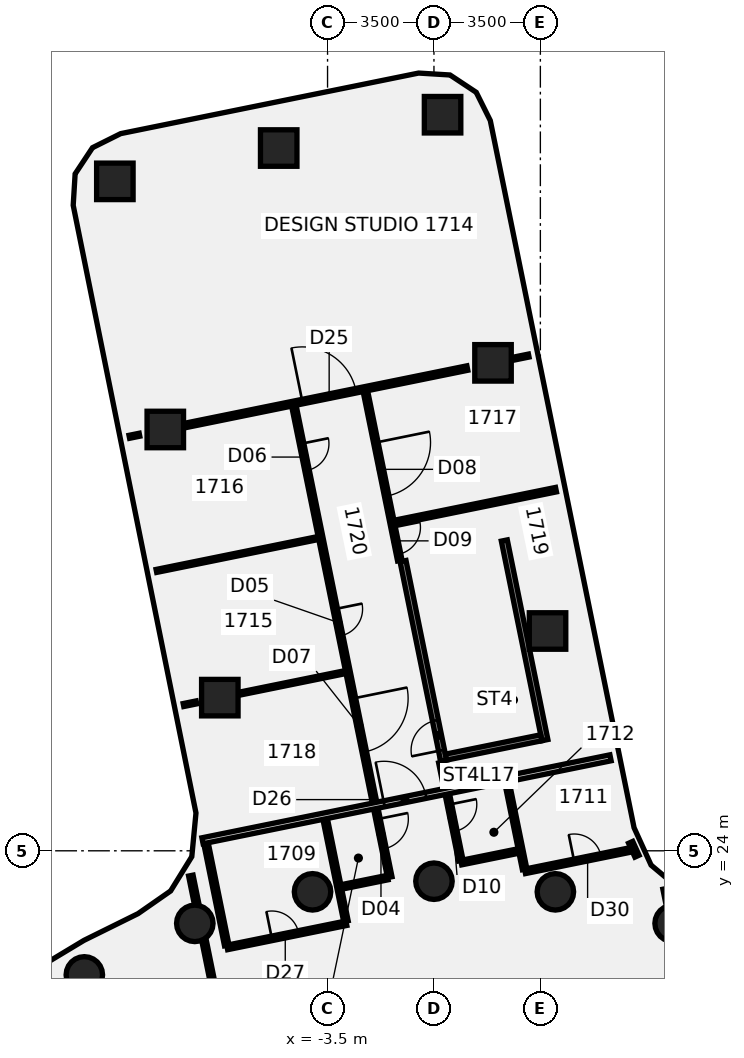
"""IFC4 building model, lengths in metres.
Left out: names, types, materials, properties, quantities, classifications, styles, units other than length and angle.
Written with IfcOpenShell. Run it as: python <this file> out.ifc"""

import sys

from ifc_helpers import new_model, si_unit, direction, frame, frame_2d, origin, origin_2d, place, context, subcontext, project, spatial, polyline, rectangle, circle, outline, extrude, element, fill, save


model = new_model("IFC4")
c1 = context("Model", 3, precision=1e-05, world=origin(), true_north=direction((0.0, 1.0)))
c2 = subcontext(c1, "Body", "Model", "MODEL_VIEW")
j1 = project(units=[si_unit("LENGTHUNIT", "METRE"), si_unit("PLANEANGLEUNIT", "RADIAN")], contexts=[c1])
p1 = place(None, origin())
s1 = spatial("IfcSite", under=j1, at=p1, CompositionType="ELEMENT")
p2 = place(p1, origin())
s2 = spatial("IfcBuilding", under=s1, at=p2, CompositionType="ELEMENT")
p3 = place(p2, frame((0.0, 0.0, 75.25)))
s3 = spatial("IfcBuildingStorey", under=s2, at=p3, CompositionType="ELEMENT", Elevation=75.25)
for number, where, z_axis, x_axis in (
    (1, (7.866, 21.613, -0.14), (0.0, 0.0, 1.0), (1.0, 0.0, 0.0)),
    (2, (3.994, 22.651, -0.14), (0.0, 0.0, 1.0), (1.0, 0.0, 0.0)),
    (3, (0.0, 23.0, -0.14), (0.0, 0.0, 1.0), (1.0, 0.0, 0.0)),
    (4, (-3.994, 22.651, -0.14), (0.0, 0.0, 1.0), (1.0, 0.0, 0.0)),
    (5, (-7.866, 21.613, -0.14), (0.0, 0.0, 1.0), (1.0, 0.0, 0.0)),
    (6, (-11.5, 19.919, -0.14), (0.0, 0.0, 1.0), (1.0, 0.0, 0.0)),
):
    element("IfcColumn", number, at=place(p3, frame(where, z_axis=z_axis, x_axis=x_axis)), inside=s3, PredefinedType="COLUMN", context=c2, shape_type="SweptSolid", body=[
        extrude(circle(Radius=0.6, at=origin_2d()), origin(), (0.0, 0.0, 1.0), 3.71),
    ])
p4 = place(p3, frame((-8.837, 37.857, -0.138), z_axis=(-0.07725535249, -0.043948835728, 0.996042223176), x_axis=(0.97674033462, 0.197093187203, 0.084454687756)))
e7 = element("IfcColumn", 7, at=p4, inside=s3, PredefinedType="COLUMN", context=c2, shape_type="SweptSolid", body=[
    extrude(rectangle(XDim=1.2, YDim=1.2, at=origin_2d()), origin(), (0.0, 0.0, 1.0), 3.716),
])
p5 = place(p3, frame((1.943, 40.049, -0.138), z_axis=(-0.088440845648, 0.008673247864, 0.996043669521), x_axis=(0.198432607845, -0.979765603585, 0.026150758614)))
e8 = element("IfcColumn", 8, at=p5, inside=s3, PredefinedType="COLUMN", context=c2, shape_type="SweptSolid", body=[
    extrude(rectangle(XDim=1.2, YDim=1.2, at=origin_2d()), origin(), (0.0, 0.0, 1.0), 3.716),
])
p6 = place(p3, frame((-7.043, 29.038, -0.139), z_axis=(-0.034232693176, -0.034891014198, 0.998804655499), x_axis=(0.979256198152, 0.198537646121, 0.040498166061)))
e9 = element("IfcColumn", 9, at=p6, inside=s3, PredefinedType="COLUMN", context=c2, shape_type="SweptSolid", body=[
    extrude(rectangle(XDim=1.2, YDim=1.2, at=origin_2d()), origin(), (0.0, 0.0, 1.0), 3.708),
])
p7 = place(p3, frame((3.736, 31.229, -0.139), z_axis=(-0.045427257265, 0.017907556487, 0.99880713039), x_axis=(0.198653368973, -0.979708767156, 0.026600198356)))
e10 = element("IfcColumn", 10, at=p7, inside=s3, PredefinedType="COLUMN", context=c2, shape_type="SweptSolid", body=[
    extrude(rectangle(XDim=1.2, YDim=1.2, at=origin_2d()), origin(), (0.0, 0.0, 1.0), 3.708),
])
p8 = place(p3, frame((0.283, 48.21, -0.138), z_axis=(-0.127200295059, -0.002356773352, 0.991874251383), x_axis=(0.197697779503, -0.979992577374, 0.023024688323)))
e11 = element("IfcColumn", 11, at=p8, inside=s3, PredefinedType="COLUMN", context=c2, shape_type="SweptSolid", body=[
    extrude(rectangle(XDim=1.2, YDim=1.2, at=origin_2d()), origin(), (0.0, 0.0, 1.0), 3.729),
])
p9 = place(p3, frame((-5.106, 47.114, -0.138), z_axis=(-0.121695461927, -0.028607271039, 0.992155148447), x_axis=(0.972318457177, 0.197441138054, 0.124955251334)))
e12 = element("IfcColumn", 12, at=p9, inside=s3, PredefinedType="COLUMN", context=c2, shape_type="SweptSolid", body=[
    extrude(rectangle(XDim=1.2, YDim=1.2, at=origin_2d()), origin(), (0.0, 0.0, 1.0), 3.729),
])
p10 = place(p3, frame((-10.496, 46.018, -0.138), z_axis=(-0.116046339335, -0.054848749218, 0.991728219744), x_axis=(0.972644227532, 0.1960216138, 0.124654456691)))
e13 = element("IfcColumn", 13, at=p10, inside=s3, PredefinedType="COLUMN", context=c2, shape_type="SweptSolid", body=[
    extrude(rectangle(XDim=1.2, YDim=1.2, at=origin_2d()), origin(), (0.0, 0.0, 1.0), 3.73),
])
p11 = place(p3, frame((-7.997, 23.185, 0.0), z_axis=(0.0, 0.0, 1.0), x_axis=(0.199166137736, -0.979965738982, 0.0)))
e14 = element("IfcWall", 14, at=p11, inside=s3, PredefinedType="PARTITIONING", context=c2, shape_type="SweptSolid", body=[
    extrude(rectangle(XDim=1.0, YDim=0.15, at=frame_2d((0.5, 0.0))), origin(), (0.0, 0.0, 1.0), 2.97),
])
p12 = place(p3, frame((-7.569, 21.083, 0.0), z_axis=(0.0, 0.0, 1.0), x_axis=(0.199292052779, -0.979940139855, 0.0)))
e15 = element("IfcWall", 15, at=p12, inside=s3, PredefinedType="PARTITIONING", context=c2, shape_type="SweptSolid", body=[
    extrude(rectangle(XDim=9.296, YDim=0.15, at=frame_2d((4.648, 0.0))), origin(), (0.0, 0.0, 1.0), 2.97),
])
p13 = place(p3, frame((-7.499, 24.251, 0.0), z_axis=(0.0, 0.0, 1.0), x_axis=(0.199153914045, -0.97996822322, 0.0)))
e16 = element("IfcWall", 16, at=p13, inside=s3, PredefinedType="PARTITIONING", context=c2, shape_type="SweptSolid", body=[
    extrude(rectangle(XDim=3.43, YDim=0.15, at=frame_2d((1.715, 0.0))), origin(), (0.0, 0.0, 1.0), 2.97),
])
p14 = place(p3, frame((-4.608, 38.64, 0.0), z_axis=(0.0, 0.0, 1.0), x_axis=(0.199328235369, -0.979932780646, 0.0)))
e17 = element("IfcWall", 17, at=p14, inside=s3, PredefinedType="PARTITIONING", context=c2, shape_type="SweptSolid", body=[
    extrude(rectangle(XDim=15.825, YDim=0.15, at=frame_2d((7.912, 0.0))), origin(), (0.0, 0.0, 1.0), 2.87),
])
p15 = place(p14, frame((13.875, 0.0, 0.0)))
e18 = element("IfcOpeningElement", 18, at=p15, cuts=e17, PredefinedType="OPENING", context=c2, shape_type="SweptSolid", body=[
    extrude(rectangle(XDim=1.0, YDim=2.1, at=frame_2d((0.5, 1.05))), frame((0.0, 0.085, 0.0), z_axis=(0.0, -1.0, 0.0), x_axis=(1.0, 0.0, 0.0)), (0.0, 0.0, 1.0), 0.17),
])
p16 = place(p14, frame((6.825, 0.0, 0.0)))
e19 = element("IfcOpeningElement", 19, at=p16, cuts=e17, PredefinedType="OPENING", context=c2, shape_type="SweptSolid", body=[
    extrude(rectangle(XDim=0.9, YDim=2.1, at=frame_2d((0.45, 1.05))), frame((0.0, 0.085, 0.0), z_axis=(0.0, -1.0, 0.0), x_axis=(1.0, 0.0, 0.0)), (0.0, 0.0, 1.0), 0.17),
])
p17 = place(p14, frame((1.275, 0.0, 0.0)))
e20 = element("IfcOpeningElement", 20, at=p17, cuts=e17, PredefinedType="OPENING", context=c2, shape_type="SweptSolid", body=[
    extrude(rectangle(XDim=0.9, YDim=2.1, at=frame_2d((0.45, 1.05))), frame((0.0, 0.085, 0.0), z_axis=(0.0, -1.0, 0.0), x_axis=(1.0, 0.0, 0.0)), (0.0, 0.0, 1.0), 0.17),
])
p18 = place(p14, frame((9.825, 0.0, 0.0)))
e21 = element("IfcOpeningElement", 21, at=p18, cuts=e17, PredefinedType="OPENING", context=c2, shape_type="SweptSolid", body=[
    extrude(rectangle(XDim=1.8, YDim=2.1, at=frame_2d((0.9, 1.05))), frame((0.0, 0.085, 0.0), z_axis=(0.0, -1.0, 0.0), x_axis=(1.0, 0.0, 0.0)), (0.0, 0.0, 1.0), 0.17),
])
p19 = place(p3, frame((-3.579, 25.048, 0.0), z_axis=(0.0, 0.0, 1.0), x_axis=(0.199140023723, -0.979971045976, 0.0)))
e22 = element("IfcWall", 22, at=p19, inside=s3, PredefinedType="PARTITIONING", context=c2, shape_type="SweptSolid", body=[
    extrude(rectangle(XDim=3.43, YDim=0.15, at=frame_2d((1.715, 0.0))), origin(), (0.0, 0.0, 1.0), 2.87),
])
p20 = place(p3, frame((-2.256, 39.118, 0.0), z_axis=(0.0, 0.0, 1.0), x_axis=(0.199270008321, -0.979944622815, 0.0)))
e23 = element("IfcWall", 23, at=p20, inside=s3, PredefinedType="PARTITIONING", context=c2, shape_type="SweptSolid", body=[
    extrude(rectangle(XDim=5.685, YDim=0.15, at=frame_2d((2.842, 0.0))), origin(), (0.0, 0.0, 1.0), 2.87),
])
p21 = place(p20, frame((1.725, 0.0, 0.0)))
e24 = element("IfcOpeningElement", 24, at=p21, cuts=e23, PredefinedType="OPENING", context=c2, shape_type="SweptSolid", body=[
    extrude(rectangle(XDim=1.8, YDim=2.1, at=frame_2d((0.9, 1.05))), frame((0.0, 0.085, 0.0), z_axis=(0.0, -1.0, 0.0), x_axis=(1.0, 0.0, 0.0)), (0.0, 0.0, 1.0), 0.17),
])
p22 = place(p20, frame((4.575, 0.0, 0.0)))
e25 = element("IfcOpeningElement", 25, at=p22, cuts=e23, PredefinedType="OPENING", context=c2, shape_type="SweptSolid", body=[
    extrude(rectangle(XDim=0.9, YDim=2.1, at=frame_2d((0.45, 1.05))), frame((0.0, 0.085, 0.0), z_axis=(0.0, -1.0, 0.0), x_axis=(1.0, 0.0, 0.0)), (0.0, 0.0, 1.0), 0.17),
])
p23 = place(p3, frame((0.228, 26.904, 0.0), z_axis=(0.0, 0.0, 1.0), x_axis=(0.199254798656, -0.97994771555, 0.0)))
e26 = element("IfcWall", 26, at=p23, inside=s3, PredefinedType="PARTITIONING", context=c2, shape_type="SweptSolid", body=[
    extrude(rectangle(XDim=3.29, YDim=0.15, at=frame_2d((1.645, 0.0))), origin(), (0.0, 0.0, 1.0), 2.87),
])
p24 = place(p23, frame((1.41, 0.0, 0.0)))
e27 = element("IfcOpeningElement", 27, at=p24, cuts=e26, PredefinedType="OPENING", context=c2, shape_type="SweptSolid", body=[
    extrude(rectangle(XDim=0.9, YDim=2.1, at=frame_2d((0.45, 1.05))), frame((0.0, 0.085, 0.0), z_axis=(0.0, -1.0, 0.0), x_axis=(1.0, 0.0, 0.0)), (0.0, 0.0, 1.0), 0.17),
])
p25 = place(p3, frame((2.399, 26.263, 0.0), z_axis=(0.0, 0.0, 1.0), x_axis=(0.199208761574, -0.97995707524, 0.0)))
e28 = element("IfcWall", 28, at=p25, inside=s3, PredefinedType="PARTITIONING", context=c2, shape_type="SweptSolid", body=[
    extrude(rectangle(XDim=2.929, YDim=0.15, at=frame_2d((1.464, 0.0))), origin(), (0.0, 0.0, 1.0), 2.87),
])
p26 = place(p3, frame((7.603, 22.751, 0.0), z_axis=(0.0, 0.0, 1.0), x_axis=(0.1988702456, -0.980025828953, 0.0)))
e29 = element("IfcWall", 29, at=p26, inside=s3, PredefinedType="PARTITIONING", context=c2, shape_type="SweptSolid", body=[
    extrude(rectangle(XDim=0.579, YDim=0.15, at=frame_2d((0.29, 0.0))), origin(), (0.0, 0.0, 1.0), 2.97),
])
p27 = place(p3, frame((-10.021, 37.616, 0.0), z_axis=(0.0, 0.0, 1.0), x_axis=(0.979943754842, 0.199274276677, 0.0)))
e30 = element("IfcWall", 30, at=p27, inside=s3, PredefinedType="PARTITIONING", context=c2, shape_type="SweptSolid", body=[
    extrude(rectangle(XDim=0.342, YDim=0.1, at=frame_2d((0.171, 0.0))), origin(), (0.0, 0.0, 1.0), 2.97),
])
p28 = place(p3, frame((-8.302, 37.966, 0.0), z_axis=(0.0, 0.0, 1.0), x_axis=(0.979936241005, 0.19931122288, 0.0)))
e31 = element("IfcWall", 31, at=p28, inside=s3, PredefinedType="PARTITIONING", context=c2, shape_type="SweptSolid", body=[
    extrude(rectangle(XDim=9.592, YDim=0.15, at=frame_2d((4.796, 0.0))), origin(), (0.0, 0.0, 1.0), 2.87),
])
p29 = place(p28, frame((4.054, 0.0, 0.0)))
e32 = element("IfcOpeningElement", 32, at=p29, cuts=e31, PredefinedType="OPENING", context=c2, shape_type="SweptSolid", body=[
    extrude(rectangle(XDim=1.8, YDim=2.1, at=frame_2d((0.9, 1.05))), frame((0.0, 0.085, 0.0), z_axis=(0.0, -1.0, 0.0), x_axis=(1.0, 0.0, 0.0)), (0.0, 0.0, 1.0), 0.17),
])
p30 = place(p3, frame((2.483, 40.159, 0.0), z_axis=(0.0, 0.0, 1.0), x_axis=(0.979996509595, 0.199014675795, 0.0)))
e33 = element("IfcWall", 33, at=p30, inside=s3, PredefinedType="PARTITIONING", context=c2, shape_type="SweptSolid", body=[
    extrude(rectangle(XDim=0.648, YDim=0.1, at=frame_2d((0.324, 0.0))), origin(), (0.0, 0.0, 1.0), 2.97),
])
p31 = place(p3, frame((-9.13, 33.205, 0.0), z_axis=(0.0, 0.0, 1.0), x_axis=(0.979942010799, 0.199282852927, 0.0)))
e34 = element("IfcWall", 34, at=p31, inside=s3, PredefinedType="PARTITIONING", context=c2, shape_type="SweptSolid", body=[
    extrude(rectangle(XDim=5.439, YDim=0.1, at=frame_2d((2.72, 0.0))), origin(), (0.0, 0.0, 1.0), 2.87),
])
p32 = place(p3, frame((-1.301, 34.797, 0.0), z_axis=(0.0, 0.0, 1.0), x_axis=(0.979943665147, 0.199274717759, 0.0)))
e35 = element("IfcWall", 35, at=p32, inside=s3, PredefinedType="PARTITIONING", context=c2, shape_type="SweptSolid", body=[
    extrude(rectangle(XDim=5.424, YDim=0.15, at=frame_2d((2.712, 0.0))), origin(), (0.0, 0.0, 1.0), 2.87),
])
p33 = place(p3, frame((-8.239, 28.794, 0.0), z_axis=(0.0, 0.0, 1.0), x_axis=(0.979971928463, 0.199135680941, 0.0)))
e36 = element("IfcWall", 36, at=p33, inside=s3, PredefinedType="PARTITIONING", context=c2, shape_type="SweptSolid", body=[
    extrude(rectangle(XDim=0.435, YDim=0.1, at=frame_2d((0.218, 0.0))), origin(), (0.0, 0.0, 1.0), 2.97),
])
p34 = place(p3, frame((-6.428, 29.163, 0.0), z_axis=(0.0, 0.0, 1.0), x_axis=(0.979949020508, 0.199248380685, 0.0)))
e37 = element("IfcWall", 37, at=p34, inside=s3, PredefinedType="PARTITIONING", context=c2, shape_type="SweptSolid", body=[
    extrude(rectangle(XDim=3.596, YDim=0.1, at=frame_2d((1.798, 0.0))), origin(), (0.0, 0.0, 1.0), 2.97),
])
p35 = place(p3, frame((-7.613, 24.33, 0.0), z_axis=(0.0, 0.0, 1.0), x_axis=(0.979948993984, 0.199248511138, 0.0)))
e38 = element("IfcWall", 38, at=p35, inside=s3, PredefinedType="PARTITIONING", context=c2, shape_type="SweptSolid", body=[
    extrude(rectangle(XDim=13.695, YDim=0.2, at=frame_2d((6.848, 0.0))), origin(), (0.0, 0.0, 1.0), 2.87),
])
p36 = place(p35, frame((6.096, 0.0, 0.0)))
e39 = element("IfcOpeningElement", 39, at=p36, cuts=e38, PredefinedType="OPENING", context=c2, shape_type="SweptSolid", body=[
    extrude(rectangle(XDim=1.4, YDim=2.1, at=frame_2d((0.7, 1.05))), frame((0.0, 0.11, 0.0), z_axis=(0.0, -1.0, 0.0), x_axis=(1.0, 0.0, 0.0)), (0.0, 0.0, 1.0), 0.22),
])
p37 = place(p3, frame((-6.802, 20.821, 0.0), z_axis=(0.0, 0.0, 1.0), x_axis=(0.979956053702, 0.199213786702, 0.0)))
e40 = element("IfcWall", 40, at=p37, inside=s3, PredefinedType="PARTITIONING", context=c2, shape_type="SweptSolid", body=[
    extrude(rectangle(XDim=4.0, YDim=0.15, at=frame_2d((2.0, 0.0))), origin(), (0.0, 0.0, 1.0), 2.97),
])
p38 = place(p37, frame((1.5, 0.0, 0.0)))
e41 = element("IfcOpeningElement", 41, at=p38, cuts=e40, PredefinedType="OPENING", context=c2, shape_type="SweptSolid", body=[
    extrude(rectangle(XDim=0.9, YDim=2.1, at=frame_2d((0.45, 1.05))), frame((0.0, 0.085, 0.0), z_axis=(0.0, -1.0, 0.0), x_axis=(1.0, 0.0, 0.0)), (0.0, 0.0, 1.0), 0.17),
])
p39 = place(p3, frame((-3.048, 22.81, 0.0), z_axis=(0.0, 0.0, 1.0), x_axis=(0.980015066338, 0.198923276041, 0.0)))
e42 = element("IfcWall", 42, at=p39, inside=s3, PredefinedType="PARTITIONING", context=c2, shape_type="SweptSolid", body=[
    extrude(rectangle(XDim=1.555, YDim=0.15, at=frame_2d((0.777, 0.0))), origin(), (0.0, 0.0, 1.0), 2.97),
])
p40 = place(p3, frame((0.897, 23.611, 0.0), z_axis=(0.0, 0.0, 1.0), x_axis=(0.980000847633, 0.19899331305, 0.0)))
e43 = element("IfcWall", 43, at=p40, inside=s3, PredefinedType="PARTITIONING", context=c2, shape_type="SweptSolid", body=[
    extrude(rectangle(XDim=1.925, YDim=0.15, at=frame_2d((0.962, 0.0))), origin(), (0.0, 0.0, 1.0), 2.97),
])
p41 = place(p3, frame((2.996, 23.324, 0.0), z_axis=(0.0, 0.0, 1.0), x_axis=(0.979983772103, 0.199077388004, 0.0)))
e44 = element("IfcWall", 44, at=p41, inside=s3, PredefinedType="PARTITIONING", context=c2, shape_type="SweptSolid", body=[
    extrude(rectangle(XDim=3.566, YDim=0.15, at=frame_2d((1.783, 0.0))), origin(), (0.0, 0.0, 1.0), 2.97),
])
p42 = place(p41, frame((1.65, 0.0, 0.0)))
e45 = element("IfcOpeningElement", 45, at=p42, cuts=e44, PredefinedType="OPENING", context=c2, shape_type="SweptSolid", body=[
    extrude(rectangle(XDim=0.9, YDim=2.1, at=frame_2d((0.45, 1.05))), frame((0.0, 0.085, 0.0), z_axis=(0.0, -1.0, 0.0), x_axis=(1.0, 0.0, 0.0)), (0.0, 0.0, 1.0), 0.17),
])
p43 = place(p3, frame((6.678, 23.823, 0.0), z_axis=(0.0, 0.0, 1.0), x_axis=(-0.414501717586, 0.91004852954, 0.0)))
e46 = element("IfcWall", 46, at=p43, inside=s3, PredefinedType="PARTITIONING", context=c2, shape_type="SweptSolid", body=[
    extrude(rectangle(XDim=0.5, YDim=0.15, at=frame_2d((0.25, 0.0))), origin(), (0.0, 0.0, 1.0), 2.97),
])
p44 = place(p3, frame((0.318, 26.963, -0.14), z_axis=(0.0, 0.0, 1.0), x_axis=(-0.199254586655, 0.979947758657, 0.0)))
e47 = element("IfcWall", 47, at=p44, inside=s3, PredefinedType="SHEAR", context=c2, shape_type="SweptSolid", body=[
    extrude(rectangle(XDim=6.7, YDim=0.2, at=frame_2d((3.35, 0.0))), origin(), (0.0, 0.0, 1.0), 3.01),
])
p45 = place(p44, frame((0.35, 0.0, 0.0)))
e48 = element("IfcOpeningElement", 48, at=p45, cuts=e47, PredefinedType="OPENING", context=c2, shape_type="SweptSolid", body=[
    extrude(rectangle(XDim=1.0, YDim=2.1, at=frame_2d((0.5, 1.05))), frame((0.0, 0.11, 0.0), z_axis=(0.0, -1.0, 0.0), x_axis=(1.0, 0.0, 0.0)), (0.0, 0.0, 1.0), 0.22),
])
p46 = place(p3, frame((3.649, 27.64, -0.14), z_axis=(0.0, 0.0, 1.0), x_axis=(-0.199247471639, 0.979949205339, 0.0)))
e49 = element("IfcWall", 49, at=p46, inside=s3, PredefinedType="SHEAR", context=c2, shape_type="SweptSolid", body=[
    extrude(rectangle(XDim=6.7, YDim=0.2, at=frame_2d((3.35, 0.0))), origin(), (0.0, 0.0, 1.0), 3.01),
])
p47 = place(p3, frame((3.531, 27.718, -0.14), z_axis=(0.0, 0.0, 1.0), x_axis=(-0.979959637806, -0.19919615526, 0.0)))
e50 = element("IfcWall", 50, at=p47, inside=s3, PredefinedType="SHEAR", context=c2, shape_type="SweptSolid", body=[
    extrude(rectangle(XDim=3.2, YDim=0.2, at=frame_2d((1.6, 0.0))), origin(), (0.0, 0.0, 1.0), 3.01),
])
p48 = place(p3, frame((0.0, 0.0, -0.14)))
e51 = element("IfcWall", 51, at=p48, inside=s3, PredefinedType="SHEAR", context=c2, shape_type="SweptSolid", body=[
    extrude(outline(polyline([(2.256, 33.99), (2.217, 34.186), (-0.919, 33.548), (-0.879, 33.352), (2.256, 33.99)])), origin(), (0.0, 0.0, 1.0), 3.01),
])
p49 = place(p15, frame((1.0, 0.0, 0.0), z_axis=(0.0, 0.0, 1.0), x_axis=(-1.0, 0.0, 0.0)))
e52 = element("IfcDoor", 52, at=p49, inside=s3, OperationType="SINGLE_SWING_RIGHT", PredefinedType="DOOR", context=c2, shape_type="SweptSolid", body=[
    extrude(rectangle(XDim=1.0, YDim=2.1, at=frame_2d((0.5, 1.05))), frame((0.0, 0.025, 0.0), z_axis=(0.0, -1.0, 0.0), x_axis=(1.0, 0.0, 0.0)), (0.0, 0.0, 1.0), 0.05),
])
fill(e18, e52)
p50 = place(p16, frame((0.9, 0.0, 0.0), z_axis=(0.0, 0.0, 1.0), x_axis=(-1.0, 0.0, 0.0)))
e53 = element("IfcDoor", 53, at=p50, inside=s3, OperationType="SINGLE_SWING_LEFT", PredefinedType="DOOR", context=c2, shape_type="SweptSolid", body=[
    extrude(rectangle(XDim=0.9, YDim=2.1, at=frame_2d((0.45, 1.05))), frame((0.0, 0.025, 0.0), z_axis=(0.0, -1.0, 0.0), x_axis=(1.0, 0.0, 0.0)), (0.0, 0.0, 1.0), 0.05),
])
fill(e19, e53)
p51 = place(p17, frame((0.9, 0.0, 0.0), z_axis=(0.0, 0.0, 1.0), x_axis=(-1.0, 0.0, 0.0)))
e54 = element("IfcDoor", 54, at=p51, inside=s3, OperationType="SINGLE_SWING_LEFT", PredefinedType="DOOR", context=c2, shape_type="SweptSolid", body=[
    extrude(rectangle(XDim=0.9, YDim=2.1, at=frame_2d((0.45, 1.05))), frame((0.0, 0.025, 0.0), z_axis=(0.0, -1.0, 0.0), x_axis=(1.0, 0.0, 0.0)), (0.0, 0.0, 1.0), 0.05),
])
fill(e20, e54)
p52 = place(p18, frame((1.8, 0.0, 0.0), z_axis=(0.0, 0.0, 1.0), x_axis=(-1.0, 0.0, 0.0)))
e55 = element("IfcDoor", 55, at=p52, inside=s3, OperationType="DOUBLE_DOOR_SINGLE_SWING", PredefinedType="DOOR", context=c2, shape_type="SweptSolid", body=[
    extrude(rectangle(XDim=1.8, YDim=2.1, at=frame_2d((0.9, 1.05))), frame((0.0, 0.025, 0.0), z_axis=(0.0, -1.0, 0.0), x_axis=(1.0, 0.0, 0.0)), (0.0, 0.0, 1.0), 0.05),
])
fill(e21, e55)
p53 = place(p21, origin())
e56 = element("IfcDoor", 56, at=p53, inside=s3, OperationType="DOUBLE_DOOR_SINGLE_SWING", PredefinedType="DOOR", context=c2, shape_type="SweptSolid", body=[
    extrude(rectangle(XDim=1.8, YDim=2.1, at=frame_2d((0.9, 1.05))), frame((0.0, 0.025, 0.0), z_axis=(0.0, -1.0, 0.0), x_axis=(1.0, 0.0, 0.0)), (0.0, 0.0, 1.0), 0.05),
])
fill(e24, e56)
p54 = place(p22, origin())
e57 = element("IfcDoor", 57, at=p54, inside=s3, OperationType="SINGLE_SWING_LEFT", PredefinedType="DOOR", context=c2, shape_type="SweptSolid", body=[
    extrude(rectangle(XDim=0.9, YDim=2.1, at=frame_2d((0.45, 1.05))), frame((0.0, 0.025, 0.0), z_axis=(0.0, -1.0, 0.0), x_axis=(1.0, 0.0, 0.0)), (0.0, 0.0, 1.0), 0.05),
])
fill(e25, e57)
p55 = place(p24, origin())
e58 = element("IfcDoor", 58, at=p55, inside=s3, OperationType="SINGLE_SWING_LEFT", PredefinedType="DOOR", context=c2, shape_type="SweptSolid", body=[
    extrude(rectangle(XDim=0.9, YDim=2.1, at=frame_2d((0.45, 1.05))), frame((0.0, 0.025, 0.0), z_axis=(0.0, -1.0, 0.0), x_axis=(1.0, 0.0, 0.0)), (0.0, 0.0, 1.0), 0.05),
])
fill(e27, e58)
p56 = place(p29, origin())
e59 = element("IfcDoor", 59, at=p56, inside=s3, OperationType="DOUBLE_DOOR_SINGLE_SWING", PredefinedType="DOOR", context=c2, shape_type="SweptSolid", body=[
    extrude(rectangle(XDim=1.8, YDim=2.1, at=frame_2d((0.9, 1.05))), frame((0.0, 0.025, 0.0), z_axis=(0.0, -1.0, 0.0), x_axis=(1.0, 0.0, 0.0)), (0.0, 0.0, 1.0), 0.05),
])
fill(e32, e59)
p57 = place(p36, frame((1.4, 0.0, 0.0), z_axis=(0.0, 0.0, 1.0), x_axis=(-1.0, 0.0, 0.0)))
e60 = element("IfcDoor", 60, at=p57, inside=s3, OperationType="DOUBLE_DOOR_SINGLE_SWING", PredefinedType="DOOR", context=c2, shape_type="SweptSolid", body=[
    extrude(rectangle(XDim=1.4, YDim=2.1, at=frame_2d((0.7, 1.05))), frame((0.0, 0.025, 0.0), z_axis=(0.0, -1.0, 0.0), x_axis=(1.0, 0.0, 0.0)), (0.0, 0.0, 1.0), 0.05),
])
fill(e39, e60)
p58 = place(p38, origin())
e61 = element("IfcDoor", 61, at=p58, inside=s3, OperationType="SINGLE_SWING_RIGHT", PredefinedType="DOOR", context=c2, shape_type="SweptSolid", body=[
    extrude(rectangle(XDim=0.9, YDim=2.1, at=frame_2d((0.45, 1.05))), frame((0.0, 0.025, 0.0), z_axis=(0.0, -1.0, 0.0), x_axis=(1.0, 0.0, 0.0)), (0.0, 0.0, 1.0), 0.05),
])
fill(e41, e61)
p59 = place(p42, origin())
e62 = element("IfcDoor", 62, at=p59, inside=s3, OperationType="SINGLE_SWING_LEFT", PredefinedType="DOOR", context=c2, shape_type="SweptSolid", body=[
    extrude(rectangle(XDim=0.9, YDim=2.1, at=frame_2d((0.45, 1.05))), frame((0.0, 0.025, 0.0), z_axis=(0.0, -1.0, 0.0), x_axis=(1.0, 0.0, 0.0)), (0.0, 0.0, 1.0), 0.05),
])
fill(e45, e62)
p60 = place(p45, origin())
e63 = element("IfcDoor", 63, at=p60, inside=s3, OperationType="SINGLE_SWING_LEFT", PredefinedType="DOOR", context=c2, shape_type="SweptSolid", body=[
    extrude(rectangle(XDim=1.0, YDim=2.1, at=frame_2d((0.5, 1.05))), frame((0.0, 0.025, 0.0), z_axis=(0.0, -1.0, 0.0), x_axis=(1.0, 0.0, 0.0)), (0.0, 0.0, 1.0), 0.05),
])
fill(e48, e63)
save(model, sys.argv[1])
